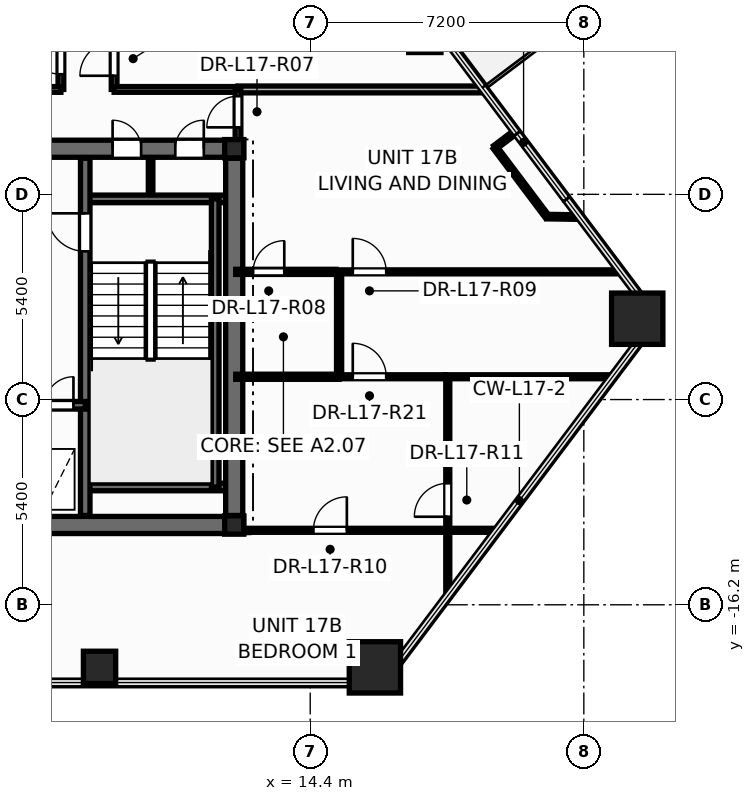
"""IFC4 building model, lengths in metres.
Left out: names, types, materials, properties, quantities, classifications, styles, units other than length and angle.
Written with IfcOpenShell. Run it as: python <this file> out.ifc"""

import sys

from ifc_helpers import new_model, si_unit, direction, frame, frame_2d, origin, origin_2d, place, context, subcontext, project, spatial, rectangle, hollow_rectangle, hollow_circle, i_section, extrude, element, fill, save


model = new_model("IFC4")
c1 = context("Model", 3, precision=1e-05, world=origin(), true_north=direction((0.0, 1.0)))
c2 = subcontext(c1, "Body", "Model", "MODEL_VIEW")
j1 = project(units=[si_unit("LENGTHUNIT", "METRE"), si_unit("PLANEANGLEUNIT", "RADIAN")], contexts=[c1])
p1 = place(None, origin())
s1 = spatial("IfcSite", under=j1, at=p1, CompositionType="ELEMENT")
p2 = place(p1, origin())
s2 = spatial("IfcBuilding", under=s1, at=p2, CompositionType="ELEMENT")
p3 = place(p2, frame((0.0, 0.0, 68.4)))
s3 = spatial("IfcBuildingStorey", under=s2, at=p3, CompositionType="ELEMENT", Elevation=68.4)
for number, where, z_axis, x_axis in (
    (1, (16.103, -17.847, 0.0), (0.0, 0.0, 1.0), (1.0, 0.0, 0.0)),
    (2, (23.005, -8.673, 0.0), (0.0, 0.0, 1.0), (1.0, 0.0, 0.0)),
):
    element("IfcColumn", number, at=place(p3, frame(where, z_axis=z_axis, x_axis=x_axis)), inside=s3, PredefinedType="COLUMN", context=c2, shape_type="SweptSolid", body=[
        extrude(hollow_rectangle(XDim=1.35, YDim=1.35, WallThickness=0.065, at=origin_2d()), origin(), (0.0, 0.0, 1.0), 3.6),
    ])
for number, where, z_axis, x_axis in (
    (3, (8.856, -17.847, 0.0), (0.0, 0.0, 1.0), (1.0, 0.0, 0.0)),
    (4, (17.416, -1.244, 0.0), (0.0, 0.0, 1.0), (1.0, 0.0, 0.0)),
):
    element("IfcColumn", number, at=place(p3, frame(where, z_axis=z_axis, x_axis=x_axis)), inside=s3, PredefinedType="COLUMN", context=c2, shape_type="SweptSolid", body=[
        extrude(hollow_circle(Radius=0.425, WallThickness=0.038, at=origin_2d()), origin(), (0.0, 0.0, 1.0), 3.6),
    ])
for number, where, z_axis, x_axis in (
    (5, (12.4, -14.1, 0.0), (0.0, 0.0, 1.0), (1.0, 0.0, 0.0)),
    (6, (12.4, -4.2, 0.0), (0.0, 0.0, 1.0), (1.0, 0.0, 0.0)),
):
    element("IfcColumn", number, at=place(p3, frame(where, z_axis=z_axis, x_axis=x_axis)), inside=s3, PredefinedType="COLUMN", context=c2, shape_type="SweptSolid", body=[
        extrude(i_section(OverallWidth=0.5, OverallDepth=0.482, WebThickness=0.04, FlangeThickness=0.045, at=origin_2d()), origin(), (0.0, 0.0, 1.0), 3.6),
    ])
p4 = place(p3, frame((10.2, -5.52, 0.0), z_axis=(0.0, 0.0, 1.0), x_axis=(0.0, 1.0, 0.0)))
e7 = element("IfcWall", 7, at=p4, inside=s3, PredefinedType="PARTITIONING", context=c2, shape_type="SweptSolid", body=[
    extrude(rectangle(XDim=1.12, YDim=0.12, at=frame_2d((0.56, 0.0))), origin(), (0.0, 0.0, 1.0), 3.35),
])
p5 = place(p3, frame((-12.65, -14.1, 0.0), z_axis=(0.0, 0.0, 1.0), x_axis=(1.0, 0.0, 0.0)))
e8 = element("IfcWall", 8, at=p5, inside=s3, PredefinedType="SHEAR", context=c2, shape_type="SweptSolid", body=[
    extrude(rectangle(XDim=25.3, YDim=0.45, at=frame_2d((12.65, 0.0))), origin(), (0.0, 0.0, 1.0), 3.6),
])
p6 = place(p3, frame((-12.65, -4.2, 0.0), z_axis=(0.0, 0.0, 1.0), x_axis=(1.0, 0.0, 0.0)))
e9 = element("IfcWall", 9, at=p6, inside=s3, PredefinedType="SHEAR", context=c2, shape_type="SweptSolid", body=[
    extrude(rectangle(XDim=25.3, YDim=0.45, at=frame_2d((12.65, 0.0))), origin(), (0.0, 0.0, 1.0), 3.6),
])
p7 = place(p6, frame((0.95, 0.0, 0.0)))
e10 = element("IfcOpeningElement", 10, at=p7, cuts=e9, PredefinedType="OPENING", context=c2, shape_type="SweptSolid", body=[
    extrude(rectangle(XDim=0.756, YDim=2.054, at=frame_2d((0.375, 1.027))), frame((0.0, 0.235, 0.0), z_axis=(0.0, -1.0, 0.0), x_axis=(1.0, 0.0, 0.0)), (0.0, 0.0, 1.0), 0.47),
])
p8 = place(p6, frame((2.6, 0.0, 0.0)))
e11 = element("IfcOpeningElement", 11, at=p8, cuts=e9, PredefinedType="OPENING", context=c2, shape_type="SweptSolid", body=[
    extrude(rectangle(XDim=0.756, YDim=2.054, at=frame_2d((0.375, 1.027))), frame((0.0, 0.235, 0.0), z_axis=(0.0, -1.0, 0.0), x_axis=(1.0, 0.0, 0.0)), (0.0, 0.0, 1.0), 0.47),
])
p9 = place(p6, frame((21.85, 0.0, 0.0)))
e12 = element("IfcOpeningElement", 12, at=p9, cuts=e9, PredefinedType="OPENING", context=c2, shape_type="SweptSolid", body=[
    extrude(rectangle(XDim=0.756, YDim=2.054, at=frame_2d((0.375, 1.027))), frame((0.0, 0.235, 0.0), z_axis=(0.0, -1.0, 0.0), x_axis=(1.0, 0.0, 0.0)), (0.0, 0.0, 1.0), 0.47),
])
p10 = place(p6, frame((23.5, 0.0, 0.0)))
e13 = element("IfcOpeningElement", 13, at=p10, cuts=e9, PredefinedType="OPENING", context=c2, shape_type="SweptSolid", body=[
    extrude(rectangle(XDim=0.756, YDim=2.054, at=frame_2d((0.375, 1.027))), frame((0.0, 0.235, 0.0), z_axis=(0.0, -1.0, 0.0), x_axis=(1.0, 0.0, 0.0)), (0.0, 0.0, 1.0), 0.47),
])
p11 = place(p6, frame((5.85, 0.0, 0.0)))
e14 = element("IfcOpeningElement", 14, at=p11, cuts=e9, PredefinedType="OPENING", context=c2, shape_type="SweptSolid", body=[
    extrude(rectangle(XDim=1.006, YDim=2.104, at=frame_2d((0.5, 1.052))), frame((0.0, 0.235, 0.0), z_axis=(0.0, -1.0, 0.0), x_axis=(1.0, 0.0, 0.0)), (0.0, 0.0, 1.0), 0.47),
])
p12 = place(p6, frame((10.35, 0.0, 0.0)))
e15 = element("IfcOpeningElement", 15, at=p12, cuts=e9, PredefinedType="OPENING", context=c2, shape_type="SweptSolid", body=[
    extrude(rectangle(XDim=1.406, YDim=2.154, at=frame_2d((0.7, 1.077))), frame((0.0, 0.235, 0.0), z_axis=(0.0, -1.0, 0.0), x_axis=(1.0, 0.0, 0.0)), (0.0, 0.0, 1.0), 0.47),
])
p13 = place(p6, frame((18.45, 0.0, 0.0)))
e16 = element("IfcOpeningElement", 16, at=p13, cuts=e9, PredefinedType="OPENING", context=c2, shape_type="SweptSolid", body=[
    extrude(rectangle(XDim=1.006, YDim=2.104, at=frame_2d((0.5, 1.052))), frame((0.0, 0.235, 0.0), z_axis=(0.0, -1.0, 0.0), x_axis=(1.0, 0.0, 0.0)), (0.0, 0.0, 1.0), 0.47),
])
for number, where, z_axis, x_axis in (
    (17, (8.48, -5.52, 0.0), (0.0, 0.0, 1.0), (1.0, 0.0, 0.0)),
    (18, (8.48, -13.1, 0.0), (0.0, 0.0, 1.0), (1.0, 0.0, 0.0)),
):
    element("IfcWall", number, at=place(p3, frame(where, z_axis=z_axis, x_axis=x_axis)), inside=s3, PredefinedType="SOLIDWALL", context=c2, shape_type="SweptSolid", body=[
        extrude(rectangle(XDim=3.87, YDim=0.2, at=frame_2d((1.935, 0.0))), origin(), (0.0, 0.0, 1.0), 3.6),
    ])
p14 = place(p3, frame((11.9, -13.1, 0.0), z_axis=(0.0, 0.0, 1.0), x_axis=(0.0, 1.0, 0.0)))
e19 = element("IfcWall", 19, at=p14, inside=s3, PredefinedType="SOLIDWALL", context=c2, shape_type="SweptSolid", body=[
    extrude(rectangle(XDim=7.58, YDim=0.2, at=frame_2d((3.79, 0.0))), origin(), (0.0, 0.0, 1.0), 3.6),
])
p15 = place(p3, frame((8.48, -13.85, 0.0), z_axis=(0.0, 0.0, 1.0), x_axis=(0.0, 1.0, 0.0)))
e20 = element("IfcWall", 20, at=p15, inside=s3, PredefinedType="SHEAR", context=c2, shape_type="SweptSolid", body=[
    extrude(rectangle(XDim=9.4, YDim=0.25, at=frame_2d((4.7, 0.0))), origin(), (0.0, 0.0, 1.0), 3.6),
])
p16 = place(p15, frame((6.95, 0.0, 0.0)))
e21 = element("IfcOpeningElement", 21, at=p16, cuts=e20, PredefinedType="OPENING", context=c2, shape_type="SweptSolid", body=[
    extrude(rectangle(XDim=1.006, YDim=2.104, at=frame_2d((0.5, 1.052))), frame((0.0, 0.135, 0.0), z_axis=(0.0, -1.0, 0.0), x_axis=(1.0, 0.0, 0.0)), (0.0, 0.0, 1.0), 0.27),
])
p17 = place(p3, frame((5.12, -10.95, 0.0), z_axis=(0.0, 0.0, 1.0), x_axis=(1.0, 0.0, 0.0)))
e22 = element("IfcWall", 22, at=p17, inside=s3, PredefinedType="SOLIDWALL", context=c2, shape_type="SweptSolid", body=[
    extrude(rectangle(XDim=3.36, YDim=0.2, at=frame_2d((1.68, 0.0))), origin(), (0.0, 0.0, 1.0), 3.6),
])
p18 = place(p17, frame((0.42, 0.0, 0.0)))
e23 = element("IfcOpeningElement", 23, at=p18, cuts=e22, PredefinedType="OPENING", context=c2, shape_type="SweptSolid", body=[
    extrude(rectangle(XDim=1.106, YDim=2.104, at=frame_2d((0.55, 1.052))), frame((0.0, 0.11, 0.0), z_axis=(0.0, -1.0, 0.0), x_axis=(1.0, 0.0, 0.0)), (0.0, 0.0, 1.0), 0.22),
])
p19 = place(p17, frame((2.3, 0.0, 0.0)))
e24 = element("IfcOpeningElement", 24, at=p19, cuts=e22, PredefinedType="OPENING", context=c2, shape_type="SweptSolid", body=[
    extrude(rectangle(XDim=0.756, YDim=2.054, at=frame_2d((0.375, 1.027))), frame((0.0, 0.11, 0.0), z_axis=(0.0, -1.0, 0.0), x_axis=(1.0, 0.0, 0.0)), (0.0, 0.0, 1.0), 0.22),
])
p20 = place(p3, frame((12.4, -13.85, 0.0), z_axis=(0.0, 0.0, 1.0), x_axis=(0.0, 1.0, 0.0)))
e25 = element("IfcWall", 25, at=p20, inside=s3, PredefinedType="SHEAR", context=c2, shape_type="SweptSolid", body=[
    extrude(rectangle(XDim=9.4, YDim=0.45, at=frame_2d((4.7, 0.0))), origin(), (0.0, 0.0, 1.0), 3.6),
])
p21 = place(p3, frame((7.84, -2.64, 0.0), z_axis=(0.0, 0.0, 1.0), x_axis=(0.0, 1.0, 0.0)))
e26 = element("IfcWall", 26, at=p21, inside=s3, PredefinedType="PARTITIONING", context=c2, shape_type="SweptSolid", body=[
    extrude(rectangle(XDim=8.5, YDim=0.15, at=frame_2d((4.25, 0.0))), origin(), (0.0, 0.0, 1.0), 2.509),
])
p22 = place(p21, frame((0.4, 0.0, 0.0)))
e27 = element("IfcOpeningElement", 27, at=p22, cuts=e26, PredefinedType="OPENING", context=c2, shape_type="SweptSolid", body=[
    extrude(rectangle(XDim=0.906, YDim=2.104, at=frame_2d((0.45, 1.052))), frame((0.0, 0.085, 0.0), z_axis=(0.0, -1.0, 0.0), x_axis=(1.0, 0.0, 0.0)), (0.0, 0.0, 1.0), 0.17),
])
p23 = place(p3, frame((9.24, -2.64, 0.0), z_axis=(0.0, 0.0, 1.0), x_axis=(0.0, 1.0, 0.0)))
e28 = element("IfcWall", 28, at=p23, inside=s3, PredefinedType="PARTITIONING", context=c2, shape_type="SweptSolid", body=[
    extrude(rectangle(XDim=8.5, YDim=0.15, at=frame_2d((4.25, 0.0))), origin(), (0.0, 0.0, 1.0), 2.509),
])
p24 = place(p23, frame((0.36, 0.0, 0.0)))
e29 = element("IfcOpeningElement", 29, at=p24, cuts=e28, PredefinedType="OPENING", context=c2, shape_type="SweptSolid", body=[
    extrude(rectangle(XDim=0.906, YDim=2.104, at=frame_2d((0.45, 1.052))), frame((0.0, 0.085, 0.0), z_axis=(0.0, -1.0, 0.0), x_axis=(1.0, 0.0, 0.0)), (0.0, 0.0, 1.0), 0.17),
])
p25 = place(p3, frame((15.08, -7.44, 0.0), z_axis=(0.0, 0.0, 1.0), x_axis=(1.0, 0.0, 0.0)))
e30 = element("IfcWall", 30, at=p25, inside=s3, PredefinedType="PARTITIONING", context=c2, shape_type="SweptSolid", body=[
    extrude(rectangle(XDim=7.498, YDim=0.105, at=frame_2d((3.749, 0.0))), origin(), (0.0, 0.0, 1.0), 2.325),
])
p26 = place(p25, frame((0.44, 0.0, 0.0)))
e31 = element("IfcOpeningElement", 31, at=p26, cuts=e30, PredefinedType="OPENING", context=c2, shape_type="SweptSolid", body=[
    extrude(rectangle(XDim=0.886, YDim=2.104, at=frame_2d((0.44, 1.052))), frame((0.0, 0.062, 0.0), z_axis=(0.0, -1.0, 0.0), x_axis=(1.0, 0.0, 0.0)), (0.0, 0.0, 1.0), 0.125),
])
p27 = place(p3, frame((12.652, -14.24, 0.0), z_axis=(0.0, 0.0, 1.0), x_axis=(1.0, 0.0, 0.0)))
e32 = element("IfcWall", 32, at=p27, inside=s3, PredefinedType="PARTITIONING", context=c2, shape_type="SweptSolid", body=[
    extrude(rectangle(XDim=6.665, YDim=0.105, at=frame_2d((3.333, 0.0))), origin(), (0.0, 0.0, 1.0), 2.713),
])
p28 = place(p27, frame((1.832, 0.0, 0.0)))
e33 = element("IfcOpeningElement", 33, at=p28, cuts=e32, PredefinedType="OPENING", context=c2, shape_type="SweptSolid", body=[
    extrude(rectangle(XDim=0.886, YDim=2.104, at=frame_2d((0.44, 1.052))), frame((0.0, 0.062, 0.0), z_axis=(0.0, -1.0, 0.0), x_axis=(1.0, 0.0, 0.0)), (0.0, 0.0, 1.0), 0.125),
])
p29 = place(p3, frame((1.262, -2.64, 0.0), z_axis=(0.0, 0.0, 1.0), x_axis=(1.0, 0.0, 0.0)))
e34 = element("IfcWall", 34, at=p29, inside=s3, PredefinedType="PARTITIONING", context=c2, shape_type="SweptSolid", body=[
    extrude(rectangle(XDim=6.578, YDim=0.15, at=frame_2d((3.289, 0.0))), origin(), (0.0, 0.0, 1.0), 2.325),
])
p30 = place(p3, frame((12.5, -2.64, 0.0), z_axis=(0.0, 0.0, 1.0), x_axis=(1.0, 0.0, 0.0)))
e35 = element("IfcWall", 35, at=p30, inside=s3, PredefinedType="PARTITIONING", context=c2, shape_type="SweptSolid", body=[
    extrude(rectangle(XDim=6.467, YDim=0.18, at=frame_2d((3.233, 0.0))), origin(), (0.0, 0.0, 1.0), 2.713),
])
p31 = place(p3, frame((18.02, -15.964, 0.0), z_axis=(0.0, 0.0, 1.0), x_axis=(0.0, 1.0, 0.0)))
e36 = element("IfcWall", 36, at=p31, inside=s3, PredefinedType="PARTITIONING", context=c2, shape_type="SweptSolid", body=[
    extrude(rectangle(XDim=5.764, YDim=0.105, at=frame_2d((2.882, 0.0))), origin(), (0.0, 0.0, 1.0), 2.713),
])
p32 = place(p31, frame((2.08, 0.0, 0.0)))
e37 = element("IfcOpeningElement", 37, at=p32, cuts=e36, PredefinedType="OPENING", context=c2, shape_type="SweptSolid", body=[
    extrude(rectangle(XDim=0.886, YDim=2.104, at=frame_2d((0.44, 1.052))), frame((0.0, 0.062, 0.0), z_axis=(0.0, -1.0, 0.0), x_axis=(1.0, 0.0, 0.0)), (0.0, 0.0, 1.0), 0.125),
])
p33 = place(p3, frame((17.96, -10.2, 0.0), z_axis=(0.0, 0.0, 1.0), x_axis=(1.0, 0.0, 0.0)))
e38 = element("IfcWall", 38, at=p33, inside=s3, PredefinedType="PARTITIONING", context=c2, shape_type="SweptSolid", body=[
    extrude(rectangle(XDim=4.397, YDim=0.105, at=frame_2d((2.198, 0.0))), origin(), (0.0, 0.0, 1.0), 2.713),
])
p34 = place(p3, frame((9.24, -2.64, 0.0), z_axis=(0.0, 0.0, 1.0), x_axis=(1.0, 0.0, 0.0)))
e39 = element("IfcWall", 39, at=p34, inside=s3, PredefinedType="PARTITIONING", context=c2, shape_type="SweptSolid", body=[
    extrude(rectangle(XDim=3.26, YDim=0.15, at=frame_2d((1.63, 0.0))), origin(), (0.0, 0.0, 1.0), 3.35),
])
p35 = place(p3, frame((15.16, -10.2, 0.0), z_axis=(0.0, 0.0, 1.0), x_axis=(1.0, 0.0, 0.0)))
e40 = element("IfcWall", 40, at=p35, inside=s3, PredefinedType="PARTITIONING", context=c2, shape_type="SweptSolid", body=[
    extrude(rectangle(XDim=2.798, YDim=0.105, at=frame_2d((1.399, 0.0))), origin(), (0.0, 0.0, 1.0), 3.35),
])
p36 = place(p35, frame((0.36, 0.0, 0.0)))
e41 = element("IfcOpeningElement", 41, at=p36, cuts=e40, PredefinedType="OPENING", context=c2, shape_type="SweptSolid", body=[
    extrude(rectangle(XDim=0.886, YDim=2.104, at=frame_2d((0.44, 1.052))), frame((0.0, 0.062, 0.0), z_axis=(0.0, -1.0, 0.0), x_axis=(1.0, 0.0, 0.0)), (0.0, 0.0, 1.0), 0.125),
])
p37 = place(p3, frame((12.44, -7.44, 0.0), z_axis=(0.0, 0.0, 1.0), x_axis=(1.0, 0.0, 0.0)))
e42 = element("IfcWall", 42, at=p37, inside=s3, PredefinedType="PARTITIONING", context=c2, shape_type="SweptSolid", body=[
    extrude(rectangle(XDim=2.638, YDim=0.135, at=frame_2d((1.319, 0.0))), origin(), (0.0, 0.0, 1.0), 2.713),
])
p38 = place(p37, frame((0.458, 0.0, 0.0)))
e43 = element("IfcOpeningElement", 43, at=p38, cuts=e42, PredefinedType="OPENING", context=c2, shape_type="SweptSolid", body=[
    extrude(rectangle(XDim=0.826, YDim=2.104, at=frame_2d((0.41, 1.052))), frame((0.0, 0.078, 0.0), z_axis=(0.0, -1.0, 0.0), x_axis=(1.0, 0.0, 0.0)), (0.0, 0.0, 1.0), 0.155),
])
p39 = place(p3, frame((15.16, -10.2, 0.0), z_axis=(0.0, 0.0, 1.0), x_axis=(0.0, 1.0, 0.0)))
e44 = element("IfcWall", 44, at=p39, inside=s3, PredefinedType="PARTITIONING", context=c2, shape_type="SweptSolid", body=[
    extrude(rectangle(XDim=2.76, YDim=0.135, at=frame_2d((1.38, 0.0))), origin(), (0.0, 0.0, 1.0), 3.35),
])
p40 = place(p3, frame((12.44, -10.2, 0.0), z_axis=(0.0, 0.0, 1.0), x_axis=(1.0, 0.0, 0.0)))
e45 = element("IfcWall", 45, at=p40, inside=s3, PredefinedType="PARTITIONING", context=c2, shape_type="SweptSolid", body=[
    extrude(rectangle(XDim=2.72, YDim=0.135, at=frame_2d((1.36, 0.0))), origin(), (0.0, 0.0, 1.0), 2.713),
])
p41 = place(p3, frame((20.633, -5.986, 0.0), z_axis=(0.0, 0.0, 1.0), x_axis=(-0.601181786604, 0.799112294647, 0.0)))
e46 = element("IfcWall", 46, at=p41, inside=s3, PredefinedType="PARTITIONING", context=c2, shape_type="SweptSolid", body=[
    extrude(rectangle(XDim=2.28, YDim=0.12, at=frame_2d((1.14, 0.0))), origin(), (0.0, 0.0, 1.0), 3.35),
])
p42 = place(p3, frame((12.5, -4.24, 0.0), z_axis=(0.0, 0.0, 1.0), x_axis=(0.0, 1.0, 0.0)))
e47 = element("IfcWall", 47, at=p42, inside=s3, PredefinedType="PARTITIONING", context=c2, shape_type="SweptSolid", body=[
    extrude(rectangle(XDim=1.6, YDim=0.15, at=frame_2d((0.8, 0.0))), origin(), (0.0, 0.0, 1.0), 2.325),
])
p43 = place(p42, frame((0.602, 0.0, 0.0)))
e48 = element("IfcOpeningElement", 48, at=p43, cuts=e47, PredefinedType="OPENING", context=c2, shape_type="SweptSolid", body=[
    extrude(rectangle(XDim=0.826, YDim=2.104, at=frame_2d((0.41, 1.052))), frame((0.0, 0.085, 0.0), z_axis=(0.0, -1.0, 0.0), x_axis=(1.0, 0.0, 0.0)), (0.0, 0.0, 1.0), 0.17),
])
p44 = place(p3, frame((21.481, -5.999, 0.0), z_axis=(0.0, 0.0, 1.0), x_axis=(-0.99987928277, 0.015537692452, 0.0)))
e49 = element("IfcWall", 49, at=p44, inside=s3, PredefinedType="PARTITIONING", context=c2, shape_type="SweptSolid", body=[
    extrude(rectangle(XDim=0.848, YDim=0.12, at=frame_2d((0.424, 0.0))), origin(), (0.0, 0.0, 1.0), 2.713),
])
p45 = place(p3, frame((19.263, -4.164, 0.0), z_axis=(0.0, 0.0, 1.0), x_axis=(0.798949061571, 0.601398700544, 0.0)))
e50 = element("IfcWall", 50, at=p45, inside=s3, PredefinedType="PARTITIONING", context=c2, shape_type="SweptSolid", body=[
    extrude(rectangle(XDim=0.67, YDim=0.12, at=frame_2d((0.335, 0.0))), origin(), (0.0, 0.0, 1.0), 2.713),
])
p46 = place(p16, origin())
e51 = element("IfcDoor", 51, at=p46, inside=s3, OperationType="SINGLE_SWING_RIGHT", PredefinedType="DOOR", context=c2, shape_type="SweptSolid", body=[
    extrude(rectangle(XDim=1.0, YDim=2.1, at=frame_2d((0.5, 1.05))), frame((0.0, 0.025, 0.0), z_axis=(0.0, -1.0, 0.0), x_axis=(1.0, 0.0, 0.0)), (0.0, 0.0, 1.0), 0.05),
])
fill(e21, e51)
p47 = place(p19, origin())
e52 = element("IfcDoor", 52, at=p47, inside=s3, OperationType="SINGLE_SWING_RIGHT", PredefinedType="DOOR", context=c2, shape_type="SweptSolid", body=[
    extrude(rectangle(XDim=0.75, YDim=2.05, at=frame_2d((0.375, 1.025))), frame((0.0, 0.025, 0.0), z_axis=(0.0, -1.0, 0.0), x_axis=(1.0, 0.0, 0.0)), (0.0, 0.0, 1.0), 0.05),
])
fill(e24, e52)
p48 = place(p9, origin())
e53 = element("IfcDoor", 53, at=p48, inside=s3, OperationType="SINGLE_SWING_LEFT", PredefinedType="DOOR", context=c2, shape_type="SweptSolid", body=[
    extrude(rectangle(XDim=0.75, YDim=2.05, at=frame_2d((0.375, 1.025))), frame((0.0, 0.025, 0.0), z_axis=(0.0, -1.0, 0.0), x_axis=(1.0, 0.0, 0.0)), (0.0, 0.0, 1.0), 0.05),
])
fill(e12, e53)
p49 = place(p10, origin())
e54 = element("IfcDoor", 54, at=p49, inside=s3, OperationType="SINGLE_SWING_RIGHT", PredefinedType="DOOR", context=c2, shape_type="SweptSolid", body=[
    extrude(rectangle(XDim=0.75, YDim=2.05, at=frame_2d((0.375, 1.025))), frame((0.0, 0.025, 0.0), z_axis=(0.0, -1.0, 0.0), x_axis=(1.0, 0.0, 0.0)), (0.0, 0.0, 1.0), 0.05),
])
fill(e13, e54)
p50 = place(p43, origin())
e55 = element("IfcDoor", 55, at=p50, inside=s3, OperationType="SINGLE_SWING_LEFT", PredefinedType="DOOR", context=c2, shape_type="SweptSolid", body=[
    extrude(rectangle(XDim=0.82, YDim=2.1, at=frame_2d((0.41, 1.05))), frame((0.0, 0.025, 0.0), z_axis=(0.0, -1.0, 0.0), x_axis=(1.0, 0.0, 0.0)), (0.0, 0.0, 1.0), 0.05),
])
fill(e48, e55)
p51 = place(p38, origin())
e56 = element("IfcDoor", 56, at=p51, inside=s3, OperationType="SINGLE_SWING_RIGHT", PredefinedType="DOOR", context=c2, shape_type="SweptSolid", body=[
    extrude(rectangle(XDim=0.82, YDim=2.1, at=frame_2d((0.41, 1.05))), frame((0.0, 0.025, 0.0), z_axis=(0.0, -1.0, 0.0), x_axis=(1.0, 0.0, 0.0)), (0.0, 0.0, 1.0), 0.05),
])
fill(e43, e56)
p52 = place(p26, origin())
e57 = element("IfcDoor", 57, at=p52, inside=s3, OperationType="SINGLE_SWING_LEFT", PredefinedType="DOOR", context=c2, shape_type="SweptSolid", body=[
    extrude(rectangle(XDim=0.88, YDim=2.1, at=frame_2d((0.44, 1.05))), frame((0.0, 0.025, 0.0), z_axis=(0.0, -1.0, 0.0), x_axis=(1.0, 0.0, 0.0)), (0.0, 0.0, 1.0), 0.05),
])
fill(e31, e57)
p53 = place(p28, origin())
e58 = element("IfcDoor", 58, at=p53, inside=s3, OperationType="SINGLE_SWING_RIGHT", PredefinedType="DOOR", context=c2, shape_type="SweptSolid", body=[
    extrude(rectangle(XDim=0.88, YDim=2.1, at=frame_2d((0.44, 1.05))), frame((0.0, 0.025, 0.0), z_axis=(0.0, -1.0, 0.0), x_axis=(1.0, 0.0, 0.0)), (0.0, 0.0, 1.0), 0.05),
])
fill(e33, e58)
p54 = place(p32, origin())
e59 = element("IfcDoor", 59, at=p54, inside=s3, OperationType="SINGLE_SWING_LEFT", PredefinedType="DOOR", context=c2, shape_type="SweptSolid", body=[
    extrude(rectangle(XDim=0.88, YDim=2.1, at=frame_2d((0.44, 1.05))), frame((0.0, 0.025, 0.0), z_axis=(0.0, -1.0, 0.0), x_axis=(1.0, 0.0, 0.0)), (0.0, 0.0, 1.0), 0.05),
])
fill(e37, e59)
p55 = place(p22, origin())
e60 = element("IfcDoor", 60, at=p55, inside=s3, OperationType="SINGLE_SWING_RIGHT", PredefinedType="DOOR", context=c2, shape_type="SweptSolid", body=[
    extrude(rectangle(XDim=0.9, YDim=2.1, at=frame_2d((0.45, 1.05))), frame((0.0, 0.025, 0.0), z_axis=(0.0, -1.0, 0.0), x_axis=(1.0, 0.0, 0.0)), (0.0, 0.0, 1.0), 0.05),
])
fill(e27, e60)
p56 = place(p24, origin())
e61 = element("IfcDoor", 61, at=p56, inside=s3, OperationType="SINGLE_SWING_LEFT", PredefinedType="DOOR", context=c2, shape_type="SweptSolid", body=[
    extrude(rectangle(XDim=0.9, YDim=2.1, at=frame_2d((0.45, 1.05))), frame((0.0, 0.025, 0.0), z_axis=(0.0, -1.0, 0.0), x_axis=(1.0, 0.0, 0.0)), (0.0, 0.0, 1.0), 0.05),
])
fill(e29, e61)
p57 = place(p36, origin())
e62 = element("IfcDoor", 62, at=p57, inside=s3, OperationType="SINGLE_SWING_LEFT", PredefinedType="DOOR", context=c2, shape_type="SweptSolid", body=[
    extrude(rectangle(XDim=0.88, YDim=2.1, at=frame_2d((0.44, 1.05))), frame((0.0, 0.025, 0.0), z_axis=(0.0, -1.0, 0.0), x_axis=(1.0, 0.0, 0.0)), (0.0, 0.0, 1.0), 0.05),
])
fill(e41, e62)
save(model, sys.argv[1])
